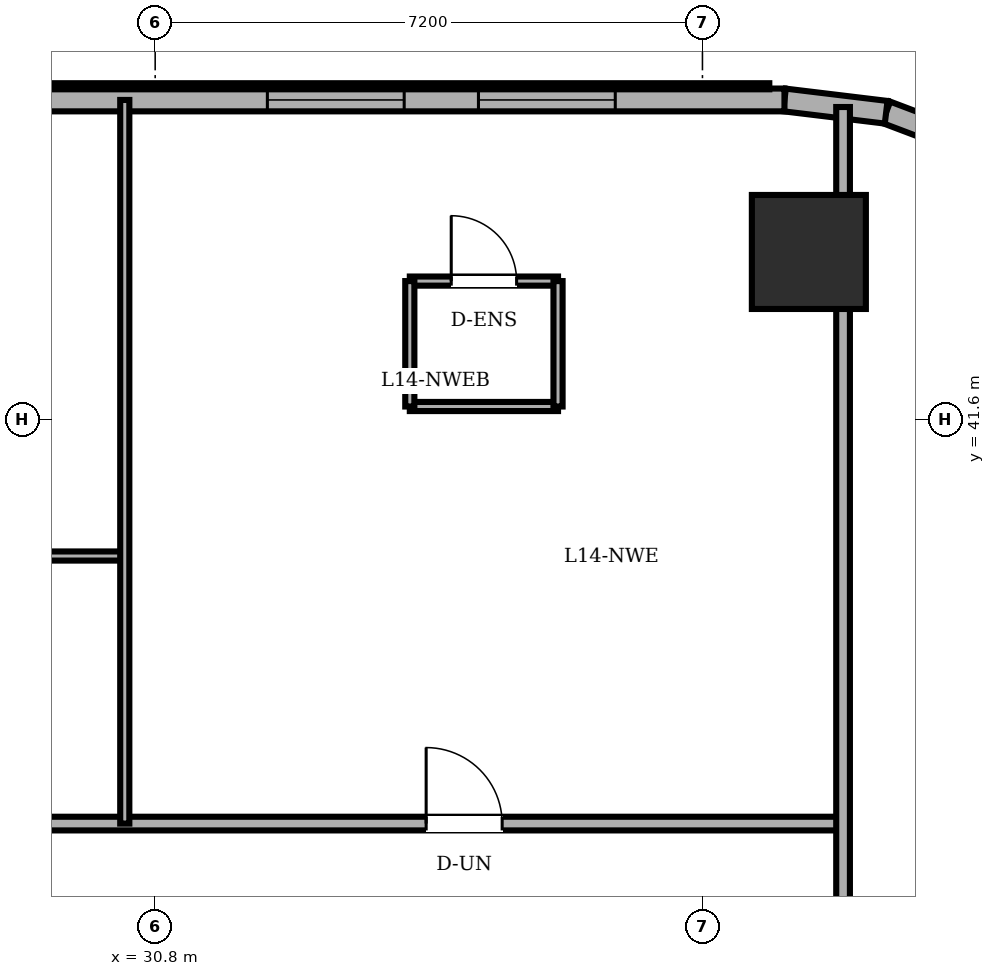
"""IFC4 building model, lengths in metres.
Left out: names, types, materials, properties, quantities, classifications, styles, units other than length and angle.
Written with IfcOpenShell. Run it as: python <this file> out.ifc"""

import sys

from ifc_helpers import new_model, si_unit, direction, frame, frame_2d, origin, origin_2d, place, context, subcontext, project, spatial, rectangle, circle, extrude, element, fill, save


model = new_model("IFC4")
c1 = context("Model", 3, precision=1e-05, world=origin(), true_north=direction((0.0, 1.0)))
c2 = subcontext(c1, "Body", "Model", "MODEL_VIEW")
j1 = project(units=[si_unit("LENGTHUNIT", "METRE"), si_unit("PLANEANGLEUNIT", "RADIAN")], contexts=[c1])
p1 = place(None, origin())
s1 = spatial("IfcSite", under=j1, at=p1, CompositionType="ELEMENT")
p2 = place(p1, origin())
s2 = spatial("IfcBuilding", under=s1, at=p2, CompositionType="ELEMENT")
p3 = place(p2, frame((0.0, 0.0, 54.0)))
s3 = spatial("IfcBuildingStorey", under=s2, at=p3, CompositionType="ELEMENT", Elevation=54.0)
p4 = place(p3, frame((39.4, 43.8, 0.0), z_axis=(0.0, 0.0, 1.0), x_axis=(1.0, 0.0, 0.0)))
e1 = element("IfcColumn", 1, at=p4, inside=s3, PredefinedType="COLUMN", context=c2, shape_type="SweptSolid", body=[
    extrude(circle(Radius=0.75, at=origin_2d()), origin(), (0.0, 0.0, 1.0), 3.6),
])
p5 = place(p3, frame((41.679, 45.16, 0.0), z_axis=(0.0, 0.0, 1.0), x_axis=(-0.935156721165, 0.354234254216, 0.0)))
e2 = element("IfcWall", 2, at=p5, inside=s3, PredefinedType="SOLIDWALL", context=c2, shape_type="SweptSolid", body=[
    extrude(rectangle(XDim=1.349, YDim=0.3, at=frame_2d((0.675, 0.0))), origin(), (0.0, 0.0, 1.0), 3.4),
])
p6 = place(p3, frame((40.417, 45.638, 0.0), z_axis=(0.0, 0.0, 1.0), x_axis=(-0.992739027259, 0.120288086515, 0.0)))
e3 = element("IfcWall", 3, at=p6, inside=s3, PredefinedType="SOLIDWALL", context=c2, shape_type="SweptSolid", body=[
    extrude(rectangle(XDim=1.348, YDim=0.3, at=frame_2d((0.674, 0.0))), origin(), (0.0, 0.0, 1.0), 3.4),
])
p7 = place(p3, frame((39.079, 45.8, 0.0), z_axis=(0.0, 0.0, 1.0), x_axis=(-1.0, 0.0, 0.0)))
e4 = element("IfcWall", 4, at=p7, inside=s3, PredefinedType="SOLIDWALL", context=c2, shape_type="SweptSolid", body=[
    extrude(rectangle(XDim=30.079, YDim=0.3, at=frame_2d((15.04, 0.0))), origin(), (0.0, 0.0, 1.0), 3.4),
])
p8 = place(p7, frame((23.904, 0.0, 0.0)))
e5 = element("IfcOpeningElement", 5, at=p8, cuts=e4, PredefinedType="OPENING", context=c2, shape_type="SweptSolid", body=[
    extrude(rectangle(XDim=0.95, YDim=2.2, at=frame_2d((0.475, 1.1))), frame((0.0, 0.16, 0.0), z_axis=(0.0, -1.0, 0.0), x_axis=(1.0, 0.0, 0.0)), (0.0, 0.0, 1.0), 0.32),
])
p9 = place(p7, frame((2.226, 0.0, 0.85)))
e6 = element("IfcOpeningElement", 6, at=p9, cuts=e4, PredefinedType="OPENING", context=c2, shape_type="SweptSolid", body=[
    extrude(rectangle(XDim=1.8, YDim=1.55, at=frame_2d((0.9, 0.775))), frame((0.0, 0.16, 0.0), z_axis=(0.0, -1.0, 0.0), x_axis=(1.0, 0.0, 0.0)), (0.0, 0.0, 1.0), 0.32),
])
p10 = place(p7, frame((5.003, 0.0, 0.85)))
e7 = element("IfcOpeningElement", 7, at=p10, cuts=e4, PredefinedType="OPENING", context=c2, shape_type="SweptSolid", body=[
    extrude(rectangle(XDim=1.8, YDim=1.55, at=frame_2d((0.9, 0.775))), frame((0.0, 0.16, 0.0), z_axis=(0.0, -1.0, 0.0), x_axis=(1.0, 0.0, 0.0)), (0.0, 0.0, 1.0), 0.32),
])
p11 = place(p7, frame((10.179, 0.0, 0.85)))
e8 = element("IfcOpeningElement", 8, at=p11, cuts=e4, PredefinedType="OPENING", context=c2, shape_type="SweptSolid", body=[
    extrude(rectangle(XDim=1.8, YDim=1.55, at=frame_2d((0.9, 0.775))), frame((0.0, 0.16, 0.0), z_axis=(0.0, -1.0, 0.0), x_axis=(1.0, 0.0, 0.0)), (0.0, 0.0, 1.0), 0.32),
])
p12 = place(p7, frame((12.579, 0.0, 0.85)))
e9 = element("IfcOpeningElement", 9, at=p12, cuts=e4, PredefinedType="OPENING", context=c2, shape_type="SweptSolid", body=[
    extrude(rectangle(XDim=1.8, YDim=1.55, at=frame_2d((0.9, 0.775))), frame((0.0, 0.16, 0.0), z_axis=(0.0, -1.0, 0.0), x_axis=(1.0, 0.0, 0.0)), (0.0, 0.0, 1.0), 0.32),
])
p13 = place(p7, frame((19.596, 0.0, 0.85)))
e10 = element("IfcOpeningElement", 10, at=p13, cuts=e4, PredefinedType="OPENING", context=c2, shape_type="SweptSolid", body=[
    extrude(rectangle(XDim=1.8, YDim=1.55, at=frame_2d((0.9, 0.775))), frame((0.0, 0.16, 0.0), z_axis=(0.0, -1.0, 0.0), x_axis=(1.0, 0.0, 0.0)), (0.0, 0.0, 1.0), 0.32),
])
p14 = place(p3, frame((34.15, 43.417, 0.0), z_axis=(0.0, 0.0, 1.0), x_axis=(1.0, 0.0, 0.0)))
e11 = element("IfcWall", 11, at=p14, inside=s3, PredefinedType="PARTITIONING", context=c2, shape_type="SweptSolid", body=[
    extrude(rectangle(XDim=1.95, YDim=0.12, at=frame_2d((0.975, 0.0))), origin(), (0.0, 0.0, 1.0), 3.4),
])
p15 = place(p14, frame((0.545, 0.0, 0.0)))
e12 = element("IfcOpeningElement", 12, at=p15, cuts=e11, PredefinedType="OPENING", context=c2, shape_type="SweptSolid", body=[
    extrude(rectangle(XDim=0.86, YDim=2.1, at=frame_2d((0.43, 1.05))), frame((0.0, 0.07, 0.0), z_axis=(0.0, -1.0, 0.0), x_axis=(1.0, 0.0, 0.0)), (0.0, 0.0, 1.0), 0.14),
])
p16 = place(p3, frame((36.1, 41.767, 0.0), z_axis=(0.0, 0.0, 1.0), x_axis=(-1.0, 0.0, 0.0)))
e13 = element("IfcWall", 13, at=p16, inside=s3, PredefinedType="PARTITIONING", context=c2, shape_type="SweptSolid", body=[
    extrude(rectangle(XDim=1.95, YDim=0.12, at=frame_2d((0.975, 0.0))), origin(), (0.0, 0.0, 1.0), 3.4),
])
for number, where, z_axis, x_axis in (
    (14, (34.15, 43.417, 0.0), (0.0, 0.0, 1.0), (0.0, -1.0, 0.0)),
    (15, (36.1, 41.767, 0.0), (0.0, 0.0, 1.0), (0.0, 1.0, 0.0)),
):
    element("IfcWall", number, at=place(p3, frame(where, z_axis=z_axis, x_axis=x_axis)), inside=s3, PredefinedType="PARTITIONING", context=c2, shape_type="SweptSolid", body=[
        extrude(rectangle(XDim=1.65, YDim=0.12, at=frame_2d((0.825, 0.0))), origin(), (0.0, 0.0, 1.0), 3.4),
    ])
p17 = place(p3, frame((3.4, 36.28, 0.0), z_axis=(0.0, 0.0, 1.0), x_axis=(1.0, 0.0, 0.0)))
e16 = element("IfcWall", 16, at=p17, inside=s3, PredefinedType="PARTITIONING", context=c2, shape_type="SweptSolid", body=[
    extrude(rectangle(XDim=36.45, YDim=0.18, at=frame_2d((18.225, 0.0))), origin(), (0.0, 0.0, 1.0), 3.4),
])
p18 = place(p17, frame((21.05, 0.0, 0.0)))
e17 = element("IfcOpeningElement", 17, at=p18, cuts=e16, PredefinedType="OPENING", context=c2, shape_type="SweptSolid", body=[
    extrude(rectangle(XDim=0.9, YDim=2.1, at=frame_2d((0.45, 1.05))), frame((0.0, 0.1, 0.0), z_axis=(0.0, -1.0, 0.0), x_axis=(1.0, 0.0, 0.0)), (0.0, 0.0, 1.0), 0.2),
])
p19 = place(p17, frame((24.67, 0.0, 0.0)))
e18 = element("IfcOpeningElement", 18, at=p19, cuts=e16, PredefinedType="OPENING", context=c2, shape_type="SweptSolid", body=[
    extrude(rectangle(XDim=0.86, YDim=2.1, at=frame_2d((0.43, 1.05))), frame((0.0, 0.1, 0.0), z_axis=(0.0, -1.0, 0.0), x_axis=(1.0, 0.0, 0.0)), (0.0, 0.0, 1.0), 0.2),
])
p20 = place(p17, frame((10.7, 0.0, 0.0)))
e19 = element("IfcOpeningElement", 19, at=p20, cuts=e16, PredefinedType="OPENING", context=c2, shape_type="SweptSolid", body=[
    extrude(rectangle(XDim=1.0, YDim=2.15, at=frame_2d((0.5, 1.075))), frame((0.0, 0.1, 0.0), z_axis=(0.0, -1.0, 0.0), x_axis=(1.0, 0.0, 0.0)), (0.0, 0.0, 1.0), 0.2),
])
p21 = place(p17, frame((30.965, 0.0, 0.0)))
e20 = element("IfcOpeningElement", 20, at=p21, cuts=e16, PredefinedType="OPENING", context=c2, shape_type="SweptSolid", body=[
    extrude(rectangle(XDim=1.0, YDim=2.15, at=frame_2d((0.5, 1.075))), frame((0.0, 0.1, 0.0), z_axis=(0.0, -1.0, 0.0), x_axis=(1.0, 0.0, 0.0)), (0.0, 0.0, 1.0), 0.2),
])
p22 = place(p3, frame((23.2, 39.8, 0.0), z_axis=(0.0, 0.0, 1.0), x_axis=(1.0, 0.0, 0.0)))
e21 = element("IfcWall", 21, at=p22, inside=s3, PredefinedType="PARTITIONING", context=c2, shape_type="SweptSolid", body=[
    extrude(rectangle(XDim=7.2, YDim=0.12, at=frame_2d((3.6, 0.0))), origin(), (0.0, 0.0, 1.0), 3.4),
])
p23 = place(p3, frame((30.4, 36.28, 0.0), z_axis=(0.0, 0.0, 1.0), x_axis=(0.0, 1.0, 0.0)))
e22 = element("IfcWall", 22, at=p23, inside=s3, PredefinedType="PARTITIONING", context=c2, shape_type="SweptSolid", body=[
    extrude(rectangle(XDim=9.52, YDim=0.12, at=frame_2d((4.76, 0.0))), origin(), (0.0, 0.0, 1.0), 3.4),
])
p24 = place(p3, frame((39.85, 25.18, 0.0), z_axis=(0.0, 0.0, 1.0), x_axis=(0.0, 1.0, 0.0)))
e23 = element("IfcWall", 23, at=p24, inside=s3, PredefinedType="PARTITIONING", context=c2, shape_type="SweptSolid", body=[
    extrude(rectangle(XDim=20.527, YDim=0.18, at=frame_2d((10.264, 0.0))), origin(), (0.0, 0.0, 1.0), 2.782),
])
p25 = place(p24, frame((5.35, 0.0, 0.0)))
e24 = element("IfcOpeningElement", 24, at=p25, cuts=e23, PredefinedType="OPENING", context=c2, shape_type="SweptSolid", body=[
    extrude(rectangle(XDim=0.92, YDim=2.1, at=frame_2d((0.46, 1.05))), frame((0.0, 0.1, 0.0), z_axis=(0.0, -1.0, 0.0), x_axis=(1.0, 0.0, 0.0)), (0.0, 0.0, 1.0), 0.2),
])
p26 = place(p9, origin())
e25 = element("IfcWindow", 25, at=p26, inside=s3, PartitioningType="DOUBLE_PANEL_VERTICAL", PredefinedType="WINDOW", context=c2, shape_type="SweptSolid", body=[
    extrude(rectangle(XDim=1.8, YDim=1.55, at=frame_2d((0.9, 0.775))), frame((0.0, 0.03, 0.0), z_axis=(0.0, -1.0, 0.0), x_axis=(1.0, 0.0, 0.0)), (0.0, 0.0, 1.0), 0.06),
])
fill(e6, e25)
p27 = place(p10, origin())
e26 = element("IfcWindow", 26, at=p27, inside=s3, PartitioningType="DOUBLE_PANEL_VERTICAL", PredefinedType="WINDOW", context=c2, shape_type="SweptSolid", body=[
    extrude(rectangle(XDim=1.8, YDim=1.55, at=frame_2d((0.9, 0.775))), frame((0.0, 0.03, 0.0), z_axis=(0.0, -1.0, 0.0), x_axis=(1.0, 0.0, 0.0)), (0.0, 0.0, 1.0), 0.06),
])
fill(e7, e26)
p28 = place(p15, origin())
e27 = element("IfcDoor", 27, at=p28, inside=s3, OperationType="SINGLE_SWING_LEFT", PredefinedType="DOOR", context=c2, shape_type="SweptSolid", body=[
    extrude(rectangle(XDim=0.86, YDim=2.1, at=frame_2d((0.43, 1.05))), frame((0.0, 0.025, 0.0), z_axis=(0.0, -1.0, 0.0), x_axis=(1.0, 0.0, 0.0)), (0.0, 0.0, 1.0), 0.05),
])
fill(e12, e27)
p29 = place(p21, origin())
e28 = element("IfcDoor", 28, at=p29, inside=s3, OperationType="SINGLE_SWING_LEFT", PredefinedType="DOOR", context=c2, shape_type="SweptSolid", body=[
    extrude(rectangle(XDim=1.0, YDim=2.15, at=frame_2d((0.5, 1.075))), frame((0.0, 0.025, 0.0), z_axis=(0.0, -1.0, 0.0), x_axis=(1.0, 0.0, 0.0)), (0.0, 0.0, 1.0), 0.05),
])
fill(e20, e28)
save(model, sys.argv[1])
